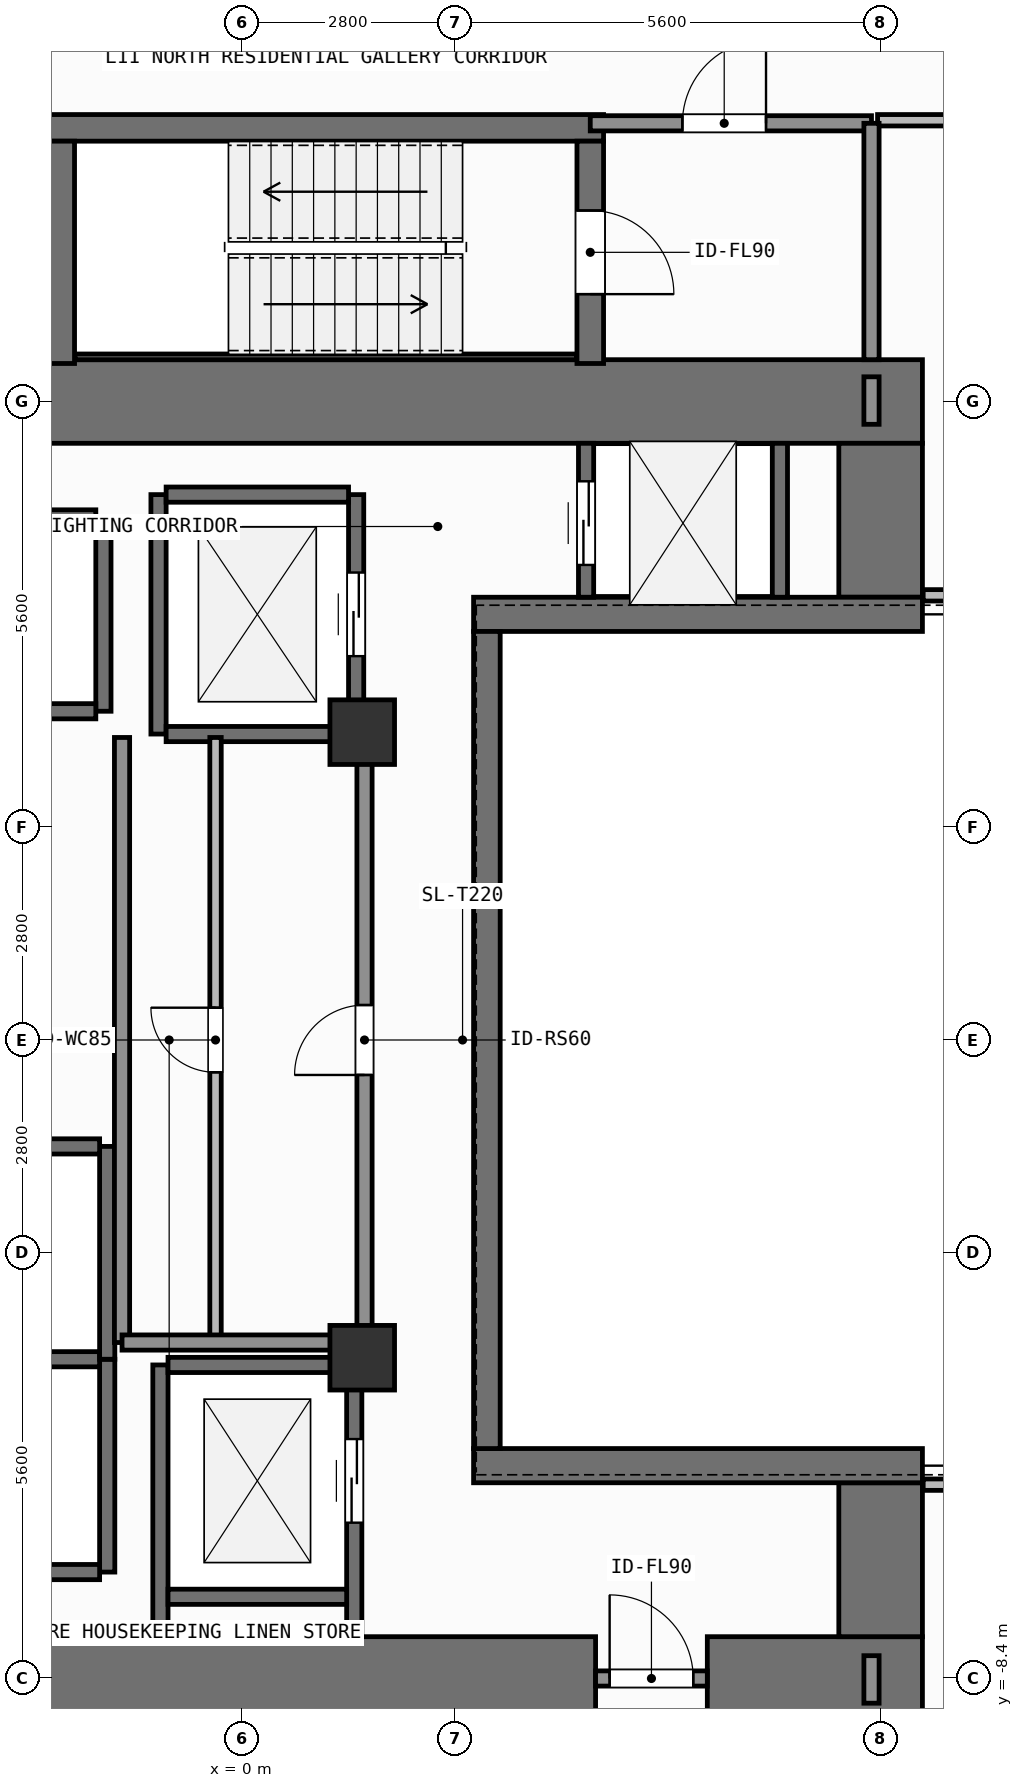
"""IFC4 building model, lengths in metres.
Left out: names, types, materials, properties, quantities, classifications, styles, units other than length and angle.
Written with IfcOpenShell. Run it as: python <this file> out.ifc"""

import sys

from ifc_helpers import new_model, si_unit, direction, frame, frame_2d, origin, origin_2d, place, context, subcontext, project, spatial, rectangle, extrude, element, fill, save


model = new_model("IFC4")
c1 = context("Model", 3, precision=1e-05, world=origin(), true_north=direction((0.0, 1.0)))
c2 = subcontext(c1, "Body", "Model", "MODEL_VIEW")
j1 = project(units=[si_unit("LENGTHUNIT", "METRE"), si_unit("PLANEANGLEUNIT", "RADIAN")], contexts=[c1])
p1 = place(None, origin())
s1 = spatial("IfcSite", under=j1, at=p1, CompositionType="ELEMENT")
p2 = place(p1, origin())
s2 = spatial("IfcBuilding", under=s1, at=p2, CompositionType="ELEMENT")
p3 = place(p2, frame((0.0, 0.0, 42.3)))
s3 = spatial("IfcBuildingStorey", under=s2, at=p3, CompositionType="ELEMENT", Elevation=42.3)
p4 = place(p3, frame((-2.62, -8.4, 0.0), z_axis=(0.0, 0.0, 1.0), x_axis=(1.0, 0.0, 0.0)))
e1 = element("IfcWall", 1, at=p4, inside=s3, PredefinedType="SHEAR", context=c2, shape_type="SweptSolid", body=[
    extrude(rectangle(XDim=7.27, YDim=1.1, at=frame_2d((3.635, 0.0))), origin(), (0.0, 0.0, 1.0), 3.9),
])
p5 = place(p3, frame((6.12, -8.4, 0.0), z_axis=(0.0, 0.0, 1.0), x_axis=(1.0, 0.0, 0.0)))
e2 = element("IfcWall", 2, at=p5, inside=s3, PredefinedType="SHEAR", context=c2, shape_type="SweptSolid", body=[
    extrude(rectangle(XDim=2.83, YDim=1.1, at=frame_2d((1.415, 0.0))), origin(), (0.0, 0.0, 1.0), 3.9),
])
p6 = place(p3, frame((-7.55, 8.4, 0.0), z_axis=(0.0, 0.0, 1.0), x_axis=(1.0, 0.0, 0.0)))
e3 = element("IfcWall", 3, at=p6, inside=s3, PredefinedType="SHEAR", context=c2, shape_type="SweptSolid", body=[
    extrude(rectangle(XDim=16.5, YDim=1.1, at=frame_2d((8.25, 0.0))), origin(), (0.0, 0.0, 1.0), 3.9),
])
for number, where, z_axis, x_axis in (
    (4, (8.4, -7.85, 0.0), (0.0, 0.0, 1.0), (0.0, 1.0, 0.0)),
    (5, (8.4, 5.825, 0.0), (0.0, 0.0, 1.0), (0.0, 1.0, 0.0)),
):
    element("IfcWall", number, at=place(p3, frame(where, z_axis=z_axis, x_axis=x_axis)), inside=s3, PredefinedType="SHEAR", context=c2, shape_type="SweptSolid", body=[
        extrude(rectangle(XDim=2.025, YDim=1.1, at=frame_2d((1.013, 0.0))), origin(), (0.0, 0.0, 1.0), 3.9),
    ])
for number, where, z_axis, x_axis in (
    (6, (3.045, -5.6, 0.0), (0.0, 0.0, 1.0), (1.0, 0.0, 0.0)),
    (7, (3.045, 5.6, 0.0), (0.0, 0.0, 1.0), (1.0, 0.0, 0.0)),
):
    element("IfcWall", number, at=place(p3, frame(where, z_axis=z_axis, x_axis=x_axis)), inside=s3, PredefinedType="SHEAR", context=c2, shape_type="SweptSolid", body=[
        extrude(rectangle(XDim=5.905, YDim=0.45, at=frame_2d((2.953, 0.0))), origin(), (0.0, 0.0, 1.0), 3.9),
    ])
p7 = place(p3, frame((3.22, -5.375, 0.0), z_axis=(0.0, 0.0, 1.0), x_axis=(0.0, 1.0, 0.0)))
e8 = element("IfcWall", 8, at=p7, inside=s3, PredefinedType="SHEAR", context=c2, shape_type="SweptSolid", body=[
    extrude(rectangle(XDim=10.75, YDim=0.35, at=frame_2d((5.375, 0.0))), origin(), (0.0, 0.0, 1.0), 3.9),
])
p8 = place(p3, frame((-2.555, 12.0, 0.0), z_axis=(0.0, 0.0, 1.0), x_axis=(1.0, 0.0, 0.0)))
e9 = element("IfcWall", 9, at=p8, inside=s3, PredefinedType="SHEAR", context=c2, shape_type="SweptSolid", body=[
    extrude(rectangle(XDim=7.31, YDim=0.35, at=frame_2d((3.655, 0.0))), origin(), (0.0, 0.0, 1.0), 3.9),
])
p9 = place(p3, frame((-2.2, 8.988, 0.0), z_axis=(0.0, 0.0, 1.0), x_axis=(1.0, 0.0, 0.0)))
e10 = element("IfcWall", 10, at=p9, inside=s3, PredefinedType="SHEAR", context=c2, shape_type="SweptSolid", body=[
    extrude(rectangle(XDim=6.6, YDim=0.075, at=frame_2d((3.3, 0.0))), origin(), (0.0, 0.0, 1.0), 3.9),
])
p10 = place(p3, frame((-2.38, 8.9, 0.0), z_axis=(0.0, 0.0, 1.0), x_axis=(0.0, 1.0, 0.0)))
e11 = element("IfcWall", 11, at=p10, inside=s3, PredefinedType="SHEAR", context=c2, shape_type="SweptSolid", body=[
    extrude(rectangle(XDim=2.925, YDim=0.35, at=frame_2d((1.462, 0.0))), origin(), (0.0, 0.0, 1.0), 3.9),
])
p11 = place(p3, frame((4.58, 11.825, 0.0), z_axis=(0.0, 0.0, 1.0), x_axis=(0.0, -1.0, 0.0)))
e12 = element("IfcWall", 12, at=p11, inside=s3, PredefinedType="SHEAR", context=c2, shape_type="SweptSolid", body=[
    extrude(rectangle(XDim=2.925, YDim=0.35, at=frame_2d((1.462, 0.0))), origin(), (0.0, 0.0, 1.0), 3.9),
])
p12 = place(p11, frame((0.913, 0.0, 0.0)))
e13 = element("IfcOpeningElement", 13, at=p12, cuts=e12, PredefinedType="OPENING", context=c2, shape_type="SweptSolid", body=[
    extrude(rectangle(XDim=1.1, YDim=2.15, at=frame_2d((0.55, 1.075))), frame((0.0, 0.185, 0.0), z_axis=(0.0, -1.0, 0.0), x_axis=(1.0, 0.0, 0.0)), (0.0, 0.0, 1.0), 0.37),
])
for number, where, z_axis, x_axis in (
    (14, (1.58, -4.18, 0.0), (0.0, 0.0, 1.0), (1.0, 0.0, 0.0)),
    (15, (1.58, 4.05, 0.0), (0.0, 0.0, 1.0), (1.0, 0.0, 0.0)),
):
    element("IfcColumn", number, at=place(p3, frame(where, z_axis=z_axis, x_axis=x_axis)), inside=s3, PredefinedType="COLUMN", context=c2, shape_type="SweptSolid", body=[
        extrude(rectangle(XDim=0.85, YDim=0.85, at=origin_2d()), origin(), (0.0, 0.0, 1.0), 3.9),
    ])
p13 = place(p3, frame((-1.825, 4.325, 0.0), z_axis=(0.0, 0.0, 1.0), x_axis=(0.0, 1.0, 0.0)))
e16 = element("IfcWall", 16, at=p13, inside=s3, PredefinedType="SHEAR", context=c2, shape_type="SweptSolid", body=[
    extrude(rectangle(XDim=2.55, YDim=0.2, at=frame_2d((1.275, 0.0))), origin(), (0.0, 0.0, 1.0), 3.68),
])
for number, where, z_axis, x_axis in (
    (17, (-4.275, 4.325, 0.0), (0.0, 0.0, 1.0), (1.0, 0.0, 0.0)),
    (18, (-4.275, 6.875, 0.0), (0.0, 0.0, 1.0), (1.0, 0.0, 0.0)),
):
    element("IfcWall", number, at=place(p3, frame(where, z_axis=z_axis, x_axis=x_axis)), inside=s3, PredefinedType="SHEAR", context=c2, shape_type="SweptSolid", body=[
        extrude(rectangle(XDim=2.35, YDim=0.2, at=frame_2d((1.175, 0.0))), origin(), (0.0, 0.0, 1.0), 3.68),
    ])
p14 = place(p3, frame((-1.775, -7.0, 0.0), z_axis=(0.0, 0.0, 1.0), x_axis=(0.0, 1.0, 0.0)))
e19 = element("IfcWall", 19, at=p14, inside=s3, PredefinedType="SHEAR", context=c2, shape_type="SweptSolid", body=[
    extrude(rectangle(XDim=2.8, YDim=0.2, at=frame_2d((1.4, 0.0))), origin(), (0.0, 0.0, 1.0), 3.68),
])
for number, where, z_axis, x_axis in (
    (20, (-4.325, -7.0, 0.0), (0.0, 0.0, 1.0), (1.0, 0.0, 0.0)),
    (21, (-4.325, -4.2, 0.0), (0.0, 0.0, 1.0), (1.0, 0.0, 0.0)),
):
    element("IfcWall", number, at=place(p3, frame(where, z_axis=z_axis, x_axis=x_axis)), inside=s3, PredefinedType="SHEAR", context=c2, shape_type="SweptSolid", body=[
        extrude(rectangle(XDim=2.45, YDim=0.2, at=frame_2d((1.225, 0.0))), origin(), (0.0, 0.0, 1.0), 3.68),
    ])
p15 = place(p3, frame((-1.775, -4.2, 0.0), z_axis=(0.0, 0.0, 1.0), x_axis=(0.0, 1.0, 0.0)))
e22 = element("IfcWall", 22, at=p15, inside=s3, PredefinedType="SHEAR", context=c2, shape_type="SweptSolid", body=[
    extrude(rectangle(XDim=2.8, YDim=0.2, at=frame_2d((1.4, 0.0))), origin(), (0.0, 0.0, 1.0), 3.68),
])
p16 = place(p3, frame((-4.325, -1.4, 0.0), z_axis=(0.0, 0.0, 1.0), x_axis=(1.0, 0.0, 0.0)))
e23 = element("IfcWall", 23, at=p16, inside=s3, PredefinedType="SHEAR", context=c2, shape_type="SweptSolid", body=[
    extrude(rectangle(XDim=2.45, YDim=0.2, at=frame_2d((1.225, 0.0))), origin(), (0.0, 0.0, 1.0), 3.68),
])
p17 = place(p3, frame((-1.1, 4.025, 0.0), z_axis=(0.0, 0.0, 1.0), x_axis=(0.0, 1.0, 0.0)))
e24 = element("IfcWall", 24, at=p17, inside=s3, PredefinedType="SHEAR", context=c2, shape_type="SweptSolid", body=[
    extrude(rectangle(XDim=3.15, YDim=0.2, at=frame_2d((1.575, 0.0))), origin(), (0.0, 0.0, 1.0), 3.68),
])
p18 = place(p3, frame((1.5, 4.025, 0.0), z_axis=(0.0, 0.0, 1.0), x_axis=(0.0, 1.0, 0.0)))
e25 = element("IfcWall", 25, at=p18, inside=s3, PredefinedType="SHEAR", context=c2, shape_type="SweptSolid", body=[
    extrude(rectangle(XDim=3.15, YDim=0.2, at=frame_2d((1.575, 0.0))), origin(), (0.0, 0.0, 1.0), 3.68),
])
p19 = place(p18, frame((1.025, 0.0, 0.0)))
e26 = element("IfcOpeningElement", 26, at=p19, cuts=e25, PredefinedType="OPENING", context=c2, shape_type="SweptSolid", body=[
    extrude(rectangle(XDim=1.1, YDim=2.2, at=frame_2d((0.55, 1.1))), frame((0.0, 0.11, 0.0), z_axis=(0.0, -1.0, 0.0), x_axis=(1.0, 0.0, 0.0)), (0.0, 0.0, 1.0), 0.22),
])
for number, where, z_axis, x_axis in (
    (27, (-1.0, 4.025, 0.0), (0.0, 0.0, 1.0), (1.0, 0.0, 0.0)),
    (28, (-1.0, 7.175, 0.0), (0.0, 0.0, 1.0), (1.0, 0.0, 0.0)),
):
    element("IfcWall", number, at=place(p3, frame(where, z_axis=z_axis, x_axis=x_axis)), inside=s3, PredefinedType="SHEAR", context=c2, shape_type="SweptSolid", body=[
        extrude(rectangle(XDim=2.4, YDim=0.2, at=frame_2d((1.2, 0.0))), origin(), (0.0, 0.0, 1.0), 3.68),
    ])
p20 = place(p3, frame((-1.075, -7.85, 0.0), z_axis=(0.0, 0.0, 1.0), x_axis=(0.0, 1.0, 0.0)))
e29 = element("IfcWall", 29, at=p20, inside=s3, PredefinedType="SHEAR", context=c2, shape_type="SweptSolid", body=[
    extrude(rectangle(XDim=3.575, YDim=0.2, at=frame_2d((1.788, 0.0))), origin(), (0.0, 0.0, 1.0), 3.68),
])
p21 = place(p3, frame((1.475, -7.85, 0.0), z_axis=(0.0, 0.0, 1.0), x_axis=(0.0, 1.0, 0.0)))
e30 = element("IfcWall", 30, at=p21, inside=s3, PredefinedType="SHEAR", context=c2, shape_type="SweptSolid", body=[
    extrude(rectangle(XDim=3.575, YDim=0.2, at=frame_2d((1.788, 0.0))), origin(), (0.0, 0.0, 1.0), 3.68),
])
p22 = place(p21, frame((1.5, 0.0, 0.0)))
e31 = element("IfcOpeningElement", 31, at=p22, cuts=e30, PredefinedType="OPENING", context=c2, shape_type="SweptSolid", body=[
    extrude(rectangle(XDim=1.1, YDim=2.2, at=frame_2d((0.55, 1.1))), frame((0.0, 0.11, 0.0), z_axis=(0.0, -1.0, 0.0), x_axis=(1.0, 0.0, 0.0)), (0.0, 0.0, 1.0), 0.22),
])
for number, where, z_axis, x_axis in (
    (32, (-0.975, -7.325, 0.0), (0.0, 0.0, 1.0), (1.0, 0.0, 0.0)),
    (33, (-0.975, -4.275, 0.0), (0.0, 0.0, 1.0), (1.0, 0.0, 0.0)),
):
    element("IfcWall", number, at=place(p3, frame(where, z_axis=z_axis, x_axis=x_axis)), inside=s3, PredefinedType="SHEAR", context=c2, shape_type="SweptSolid", body=[
        extrude(rectangle(XDim=2.35, YDim=0.2, at=frame_2d((1.175, 0.0))), origin(), (0.0, 0.0, 1.0), 3.68),
    ])
p23 = place(p3, frame((4.525, 5.825, 0.0), z_axis=(0.0, 0.0, 1.0), x_axis=(0.0, 1.0, 0.0)))
e34 = element("IfcWall", 34, at=p23, inside=s3, PredefinedType="SHEAR", context=c2, shape_type="SweptSolid", body=[
    extrude(rectangle(XDim=2.025, YDim=0.2, at=frame_2d((1.013, 0.0))), origin(), (0.0, 0.0, 1.0), 3.68),
])
p24 = place(p23, frame((0.425, 0.0, 0.0)))
e35 = element("IfcOpeningElement", 35, at=p24, cuts=e34, PredefinedType="OPENING", context=c2, shape_type="SweptSolid", body=[
    extrude(rectangle(XDim=1.1, YDim=2.2, at=frame_2d((0.55, 1.1))), frame((0.0, 0.11, 0.0), z_axis=(0.0, -1.0, 0.0), x_axis=(1.0, 0.0, 0.0)), (0.0, 0.0, 1.0), 0.22),
])
p25 = place(p3, frame((7.075, 5.825, 0.0), z_axis=(0.0, 0.0, 1.0), x_axis=(0.0, 1.0, 0.0)))
e36 = element("IfcWall", 36, at=p25, inside=s3, PredefinedType="SHEAR", context=c2, shape_type="SweptSolid", body=[
    extrude(rectangle(XDim=2.025, YDim=0.2, at=frame_2d((1.013, 0.0))), origin(), (0.0, 0.0, 1.0), 3.68),
])
p26 = place(p3, frame((4.65, -8.4, 0.0), z_axis=(0.0, 0.0, 1.0), x_axis=(1.0, 0.0, 0.0)))
e37 = element("IfcWall", 37, at=p26, inside=s3, PredefinedType="SOLIDWALL", context=c2, shape_type="SweptSolid", body=[
    extrude(rectangle(XDim=1.47, YDim=0.2, at=frame_2d((0.735, 0.0))), origin(), (0.0, 0.0, 1.0), 2.72),
])
p27 = place(p26, frame((0.185, 0.0, 0.0)))
e38 = element("IfcOpeningElement", 38, at=p27, cuts=e37, PredefinedType="OPENING", context=c2, shape_type="SweptSolid", body=[
    extrude(rectangle(XDim=1.1, YDim=2.15, at=frame_2d((0.55, 1.075))), frame((0.0, 0.11, 0.0), z_axis=(0.0, -1.0, 0.0), x_axis=(1.0, 0.0, 0.0)), (0.0, 0.0, 1.0), 0.22),
])
p28 = place(p3, frame((4.58, 12.06, 0.0), z_axis=(0.0, 0.0, 1.0), x_axis=(1.0, 0.0, 0.0)))
e39 = element("IfcWall", 39, at=p28, inside=s3, PredefinedType="SOLIDWALL", context=c2, shape_type="SweptSolid", body=[
    extrude(rectangle(XDim=3.7, YDim=0.2, at=frame_2d((1.85, 0.0))), origin(), (0.0, 0.0, 1.0), 3.68),
])
p29 = place(p28, frame((1.212, 0.0, 0.0)))
e40 = element("IfcOpeningElement", 40, at=p29, cuts=e39, PredefinedType="OPENING", context=c2, shape_type="SweptSolid", body=[
    extrude(rectangle(XDim=1.1, YDim=2.15, at=frame_2d((0.55, 1.075))), frame((0.0, 0.11, 0.0), z_axis=(0.0, -1.0, 0.0), x_axis=(1.0, 0.0, 0.0)), (0.0, 0.0, 1.0), 0.22),
])
p30 = place(p3, frame((-0.35, -3.98, 0.0), z_axis=(0.0, 0.0, 1.0), x_axis=(0.0, 1.0, 0.0)))
e41 = element("IfcWall", 41, at=p30, inside=s3, PredefinedType="PARTITIONING", context=c2, shape_type="SweptSolid", body=[
    extrude(rectangle(XDim=7.96, YDim=0.15, at=frame_2d((3.98, 0.0))), origin(), (0.0, 0.0, 1.0), 3.68),
])
p31 = place(p30, frame((3.555, 0.0, 0.0)))
e42 = element("IfcOpeningElement", 42, at=p31, cuts=e41, PredefinedType="OPENING", context=c2, shape_type="SweptSolid", body=[
    extrude(rectangle(XDim=0.85, YDim=2.1, at=frame_2d((0.425, 1.05))), frame((0.0, 0.085, 0.0), z_axis=(0.0, -1.0, 0.0), x_axis=(1.0, 0.0, 0.0)), (0.0, 0.0, 1.0), 0.17),
])
p32 = place(p3, frame((1.61, -3.98, 0.0), z_axis=(0.0, 0.0, 1.0), x_axis=(0.0, 1.0, 0.0)))
e43 = element("IfcWall", 43, at=p32, inside=s3, PredefinedType="SOLIDWALL", context=c2, shape_type="SweptSolid", body=[
    extrude(rectangle(XDim=7.96, YDim=0.2, at=frame_2d((3.98, 0.0))), origin(), (0.0, 0.0, 1.0), 3.68),
])
p33 = place(p32, frame((3.52, 0.0, 0.0)))
e44 = element("IfcOpeningElement", 44, at=p33, cuts=e43, PredefinedType="OPENING", context=c2, shape_type="SweptSolid", body=[
    extrude(rectangle(XDim=0.92, YDim=2.1, at=frame_2d((0.46, 1.05))), frame((0.0, 0.11, 0.0), z_axis=(0.0, -1.0, 0.0), x_axis=(1.0, 0.0, 0.0)), (0.0, 0.0, 1.0), 0.22),
])
p34 = place(p3, frame((8.36, 12.1, 0.0), z_axis=(0.0, 0.0, 1.0), x_axis=(1.0, 0.0, 0.0)))
e45 = element("IfcWall", 45, at=p34, inside=s3, PredefinedType="PARTITIONING", context=c2, shape_type="SweptSolid", body=[
    extrude(rectangle(XDim=7.22, YDim=0.15, at=frame_2d((3.61, 0.0))), origin(), (0.0, 0.0, 1.0), 3.68),
])
p35 = place(p34, frame((3.513, 0.0, 0.0)))
e46 = element("IfcOpeningElement", 46, at=p35, cuts=e45, PredefinedType="OPENING", context=c2, shape_type="SweptSolid", body=[
    extrude(rectangle(XDim=0.9, YDim=2.1, at=frame_2d((0.45, 1.05))), frame((0.0, 0.085, 0.0), z_axis=(0.0, -1.0, 0.0), x_axis=(1.0, 0.0, 0.0)), (0.0, 0.0, 1.0), 0.17),
])
p36 = place(p3, frame((8.28, 8.95, 0.0), z_axis=(0.0, 0.0, 1.0), x_axis=(0.0, 1.0, 0.0)))
e47 = element("IfcWall", 47, at=p36, inside=s3, PredefinedType="SOLIDWALL", context=c2, shape_type="SweptSolid", body=[
    extrude(rectangle(XDim=3.11, YDim=0.2, at=frame_2d((1.555, 0.0))), origin(), (0.0, 0.0, 1.0), 3.68),
])
p37 = place(p3, frame((-1.58, -3.98, 0.0), z_axis=(0.0, 0.0, 1.0), x_axis=(0.0, 1.0, 0.0)))
e48 = element("IfcWall", 48, at=p37, inside=s3, PredefinedType="SOLIDWALL", context=c2, shape_type="SweptSolid", body=[
    extrude(rectangle(XDim=7.96, YDim=0.2, at=frame_2d((3.98, 0.0))), origin(), (0.0, 0.0, 1.0), 3.68),
])
p38 = place(p3, frame((-1.58, -3.98, 0.0), z_axis=(0.0, 0.0, 1.0), x_axis=(1.0, 0.0, 0.0)))
e49 = element("IfcWall", 49, at=p38, inside=s3, PredefinedType="SOLIDWALL", context=c2, shape_type="SweptSolid", body=[
    extrude(rectangle(XDim=3.19, YDim=0.2, at=frame_2d((1.595, 0.0))), origin(), (0.0, 0.0, 1.0), 3.68),
])
p39 = place(p3, frame((8.28, -8.725, 0.0), z_axis=(0.0, 0.0, 1.0), x_axis=(0.0, 1.0, 0.0)))
e50 = element("IfcWall", 50, at=p39, inside=s3, PredefinedType="SOLIDWALL", context=c2, shape_type="SweptSolid", body=[
    extrude(rectangle(XDim=0.625, YDim=0.2, at=frame_2d((0.312, 0.0))), origin(), (0.0, 0.0, 1.0), 3.68),
])
p40 = place(p3, frame((8.96, -5.85, 0.0), z_axis=(0.0, 0.0, 1.0), x_axis=(1.0, 0.0, 0.0)))
e51 = element("IfcWall", 51, at=p40, inside=s3, PredefinedType="PARTITIONING", context=c2, shape_type="SweptSolid", body=[
    extrude(rectangle(XDim=6.62, YDim=0.15, at=frame_2d((3.31, 0.0))), origin(), (0.0, 0.0, 1.0), 3.68),
])
p41 = place(p3, frame((8.28, 8.1, 0.0), z_axis=(0.0, 0.0, 1.0), x_axis=(0.0, 1.0, 0.0)))
e52 = element("IfcWall", 52, at=p41, inside=s3, PredefinedType="SOLIDWALL", context=c2, shape_type="SweptSolid", body=[
    extrude(rectangle(XDim=0.625, YDim=0.2, at=frame_2d((0.312, 0.0))), origin(), (0.0, 0.0, 1.0), 3.68),
])
p42 = place(p3, frame((8.96, 5.85, 0.0), z_axis=(0.0, 0.0, 1.0), x_axis=(1.0, 0.0, 0.0)))
e53 = element("IfcWall", 53, at=p42, inside=s3, PredefinedType="PARTITIONING", context=c2, shape_type="SweptSolid", body=[
    extrude(rectangle(XDim=6.62, YDim=0.15, at=frame_2d((3.31, 0.0))), origin(), (0.0, 0.0, 1.0), 3.68),
])
p43 = place(p19, origin())
e54 = element("IfcDoor", 54, at=p43, inside=s3, OperationType="SLIDING_TO_LEFT", PredefinedType="DOOR", context=c2, shape_type="SweptSolid", body=[
    extrude(rectangle(XDim=1.1, YDim=2.2, at=frame_2d((0.55, 1.1))), frame((0.0, 0.025, 0.0), z_axis=(0.0, -1.0, 0.0), x_axis=(1.0, 0.0, 0.0)), (0.0, 0.0, 1.0), 0.05),
])
fill(e26, e54)
p44 = place(p22, origin())
e55 = element("IfcDoor", 55, at=p44, inside=s3, OperationType="SLIDING_TO_LEFT", PredefinedType="DOOR", context=c2, shape_type="SweptSolid", body=[
    extrude(rectangle(XDim=1.1, YDim=2.2, at=frame_2d((0.55, 1.1))), frame((0.0, 0.025, 0.0), z_axis=(0.0, -1.0, 0.0), x_axis=(1.0, 0.0, 0.0)), (0.0, 0.0, 1.0), 0.05),
])
fill(e31, e55)
p45 = place(p24, origin())
e56 = element("IfcDoor", 56, at=p45, inside=s3, OperationType="SLIDING_TO_LEFT", PredefinedType="DOOR", context=c2, shape_type="SweptSolid", body=[
    extrude(rectangle(XDim=1.1, YDim=2.2, at=frame_2d((0.55, 1.1))), frame((0.0, 0.025, 0.0), z_axis=(0.0, -1.0, 0.0), x_axis=(1.0, 0.0, 0.0)), (0.0, 0.0, 1.0), 0.05),
])
fill(e35, e56)
p46 = place(p12, origin())
e57 = element("IfcDoor", 57, at=p46, inside=s3, OperationType="SINGLE_SWING_RIGHT", PredefinedType="DOOR", context=c2, shape_type="SweptSolid", body=[
    extrude(rectangle(XDim=1.1, YDim=2.15, at=frame_2d((0.55, 1.075))), frame((0.0, 0.025, 0.0), z_axis=(0.0, -1.0, 0.0), x_axis=(1.0, 0.0, 0.0)), (0.0, 0.0, 1.0), 0.05),
])
fill(e13, e57)
p47 = place(p27, origin())
e58 = element("IfcDoor", 58, at=p47, inside=s3, OperationType="SINGLE_SWING_LEFT", PredefinedType="DOOR", context=c2, shape_type="SweptSolid", body=[
    extrude(rectangle(XDim=1.1, YDim=2.15, at=frame_2d((0.55, 1.075))), frame((0.0, 0.025, 0.0), z_axis=(0.0, -1.0, 0.0), x_axis=(1.0, 0.0, 0.0)), (0.0, 0.0, 1.0), 0.05),
])
fill(e38, e58)
p48 = place(p29, origin())
e59 = element("IfcDoor", 59, at=p48, inside=s3, OperationType="SINGLE_SWING_RIGHT", PredefinedType="DOOR", context=c2, shape_type="SweptSolid", body=[
    extrude(rectangle(XDim=1.1, YDim=2.15, at=frame_2d((0.55, 1.075))), frame((0.0, 0.025, 0.0), z_axis=(0.0, -1.0, 0.0), x_axis=(1.0, 0.0, 0.0)), (0.0, 0.0, 1.0), 0.05),
])
fill(e40, e59)
p49 = place(p31, origin())
e60 = element("IfcDoor", 60, at=p49, inside=s3, OperationType="SINGLE_SWING_RIGHT", PredefinedType="DOOR", context=c2, shape_type="SweptSolid", body=[
    extrude(rectangle(XDim=0.85, YDim=2.1, at=frame_2d((0.425, 1.05))), frame((0.0, 0.025, 0.0), z_axis=(0.0, -1.0, 0.0), x_axis=(1.0, 0.0, 0.0)), (0.0, 0.0, 1.0), 0.05),
])
fill(e42, e60)
p50 = place(p33, origin())
e61 = element("IfcDoor", 61, at=p50, inside=s3, OperationType="SINGLE_SWING_LEFT", PredefinedType="DOOR", context=c2, shape_type="SweptSolid", body=[
    extrude(rectangle(XDim=0.92, YDim=2.1, at=frame_2d((0.46, 1.05))), frame((0.0, 0.025, 0.0), z_axis=(0.0, -1.0, 0.0), x_axis=(1.0, 0.0, 0.0)), (0.0, 0.0, 1.0), 0.05),
])
fill(e44, e61)
save(model, sys.argv[1])
